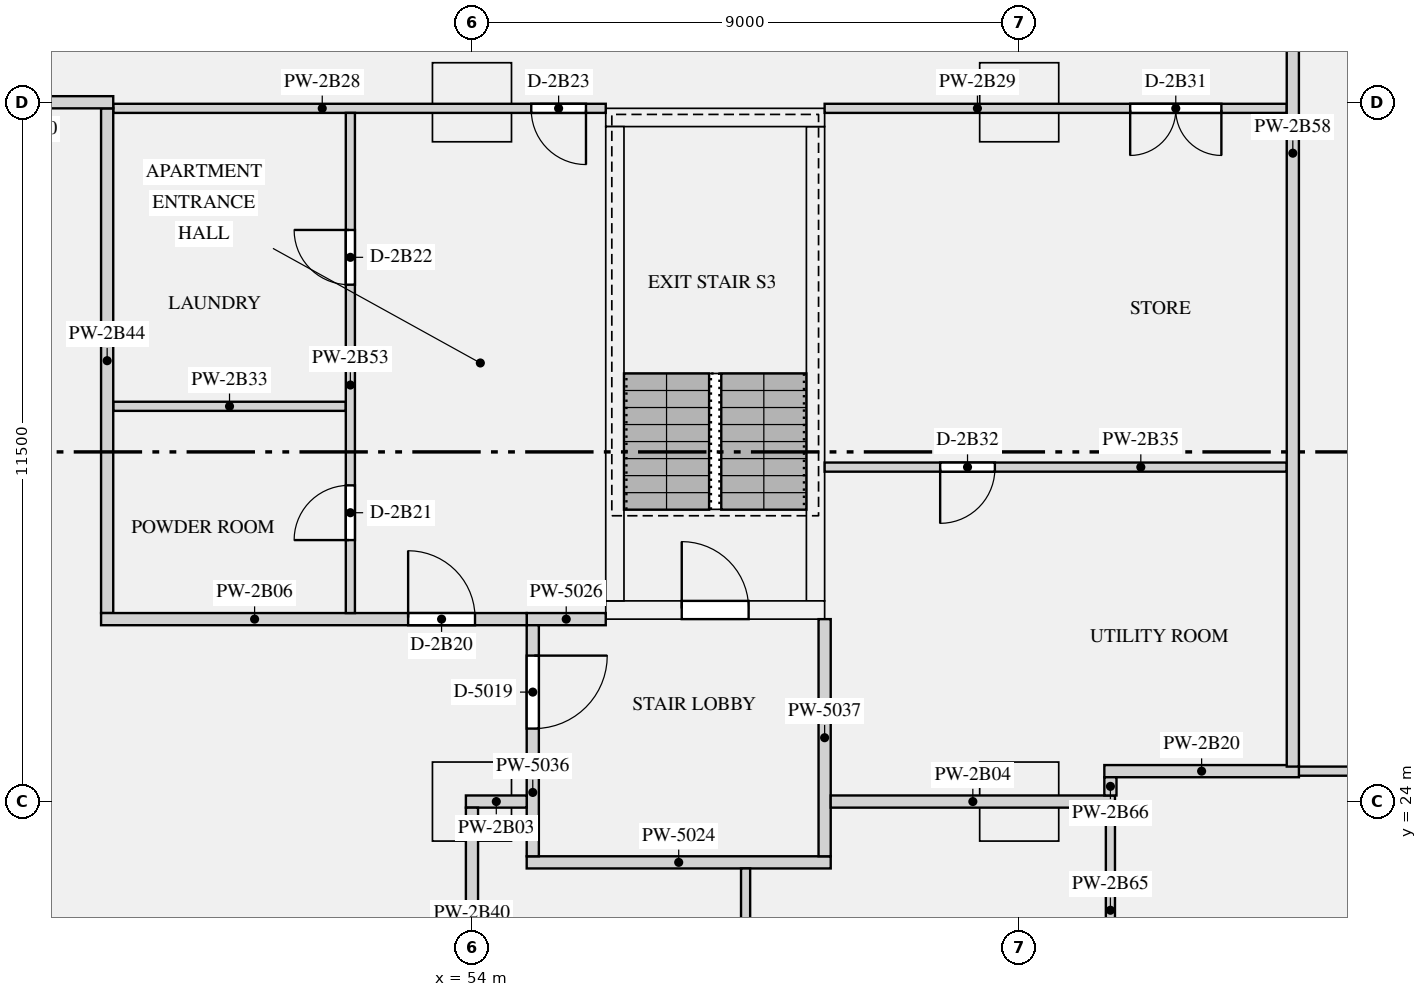
"""IFC4 building model, lengths in metres.
Left out: names, types, materials, properties, quantities, classifications, styles, units other than length and angle.
Written with IfcOpenShell. Run it as: python <this file> out.ifc"""

import sys

from ifc_helpers import new_model, si_unit, direction, frame, frame_2d, origin, origin_2d, place, context, subcontext, project, spatial, rectangle, extrude, element, fill, save


model = new_model("IFC4")
c1 = context("Model", 3, precision=1e-05, world=origin(), true_north=direction((0.0, 1.0)))
c2 = subcontext(c1, "Body", "Model", "MODEL_VIEW")
j1 = project(units=[si_unit("LENGTHUNIT", "METRE"), si_unit("PLANEANGLEUNIT", "RADIAN")], contexts=[c1])
p1 = place(None, origin())
s1 = spatial("IfcSite", under=j1, at=p1, CompositionType="ELEMENT")
p2 = place(p1, origin())
s2 = spatial("IfcBuilding", under=s1, at=p2, CompositionType="ELEMENT")
p3 = place(p2, frame((0.0, 0.0, 93.0)))
s3 = spatial("IfcBuildingStorey", under=s2, at=p3, CompositionType="ELEMENT", Elevation=93.0)
for number, where, z_axis, x_axis in (
    (1, (54.0, 24.0, 0.0), (0.0, 0.0, 1.0), (1.0, 0.0, 0.0)),
    (2, (63.0, 24.0, 0.0), (0.0, 0.0, 1.0), (1.0, 0.0, 0.0)),
    (3, (54.0, 35.5, 0.0), (0.0, 0.0, 1.0), (1.0, 0.0, 0.0)),
    (4, (63.0, 35.5, 0.0), (0.0, 0.0, 1.0), (1.0, 0.0, 0.0)),
):
    element("IfcColumn", number, at=place(p3, frame(where, z_axis=z_axis, x_axis=x_axis)), inside=s3, PredefinedType="COLUMN", context=c2, shape_type="SweptSolid", body=[
        extrude(rectangle(XDim=1.3, YDim=1.3, at=origin_2d()), origin(), (0.0, 0.0, 1.0), 3.15),
    ])
p4 = place(p3, frame((56.2, 27.15, 0.0), z_axis=(0.0, 0.0, 1.0), x_axis=(1.0, 0.0, 0.0)))
e5 = element("IfcWall", 5, at=p4, inside=s3, PredefinedType="SHEAR", context=c2, shape_type="SweptSolid", body=[
    extrude(rectangle(XDim=3.6, YDim=0.3, at=frame_2d((1.8, 0.0))), origin(), (0.0, 0.0, 1.0), 3.15),
])
p5 = place(p4, frame((1.25, 0.0, 0.0)))
e6 = element("IfcOpeningElement", 6, at=p5, cuts=e5, PredefinedType="OPENING", context=c2, shape_type="SweptSolid", body=[
    extrude(rectangle(XDim=1.1, YDim=2.1, at=frame_2d((0.55, 1.05))), frame((0.0, 0.16, 0.0), z_axis=(0.0, -1.0, 0.0), x_axis=(1.0, 0.0, 0.0)), (0.0, 0.0, 1.0), 0.32),
])
p6 = place(p3, frame((56.2, 35.25, 0.0), z_axis=(0.0, 0.0, 1.0), x_axis=(1.0, 0.0, 0.0)))
e7 = element("IfcWall", 7, at=p6, inside=s3, PredefinedType="SHEAR", context=c2, shape_type="SweptSolid", body=[
    extrude(rectangle(XDim=3.6, YDim=0.3, at=frame_2d((1.8, 0.0))), origin(), (0.0, 0.0, 1.0), 3.15),
])
for number, where, z_axis, x_axis in (
    (8, (56.35, 27.3, 0.0), (0.0, 0.0, 1.0), (0.0, 1.0, 0.0)),
    (9, (59.65, 27.3, 0.0), (0.0, 0.0, 1.0), (0.0, 1.0, 0.0)),
):
    element("IfcWall", number, at=place(p3, frame(where, z_axis=z_axis, x_axis=x_axis)), inside=s3, PredefinedType="SHEAR", context=c2, shape_type="SweptSolid", body=[
        extrude(rectangle(XDim=7.8, YDim=0.3, at=frame_2d((3.9, 0.0))), origin(), (0.0, 0.0, 1.0), 3.15),
    ])
p7 = place(p3, frame((54.9, 23.0, 0.0), z_axis=(0.0, 0.0, 1.0), x_axis=(1.0, 0.0, 0.0)))
e10 = element("IfcWall", 10, at=p7, inside=s3, PredefinedType="PARTITIONING", context=c2, shape_type="SweptSolid", body=[
    extrude(rectangle(XDim=5.0, YDim=0.2, at=frame_2d((2.5, 0.0))), origin(), (0.0, 0.0, 1.0), 2.83),
])
p8 = place(p3, frame((54.9, 27.0, 0.0), z_axis=(0.0, 0.0, 1.0), x_axis=(1.0, 0.0, 0.0)))
e11 = element("IfcWall", 11, at=p8, inside=s3, PredefinedType="PARTITIONING", context=c2, shape_type="SweptSolid", body=[
    extrude(rectangle(XDim=1.3, YDim=0.2, at=frame_2d((0.65, 0.0))), origin(), (0.0, 0.0, 1.0), 2.83),
])
p9 = place(p3, frame((55.0, 23.1, 0.0), z_axis=(0.0, 0.0, 1.0), x_axis=(0.0, 1.0, 0.0)))
e12 = element("IfcWall", 12, at=p9, inside=s3, PredefinedType="PARTITIONING", context=c2, shape_type="SweptSolid", body=[
    extrude(rectangle(XDim=3.8, YDim=0.2, at=frame_2d((1.9, 0.0))), origin(), (0.0, 0.0, 1.0), 2.83),
])
p10 = place(p9, frame((2.1, 0.0, 0.0)))
e13 = element("IfcOpeningElement", 13, at=p10, cuts=e12, PredefinedType="OPENING", context=c2, shape_type="SweptSolid", body=[
    extrude(rectangle(XDim=1.2, YDim=2.1, at=frame_2d((0.6, 1.05))), frame((0.0, 0.11, 0.0), z_axis=(0.0, -1.0, 0.0), x_axis=(1.0, 0.0, 0.0)), (0.0, 0.0, 1.0), 0.22),
])
p11 = place(p3, frame((59.8, 23.1, 0.0), z_axis=(0.0, 0.0, 1.0), x_axis=(0.0, 1.0, 0.0)))
e14 = element("IfcWall", 14, at=p11, inside=s3, PredefinedType="PARTITIONING", context=c2, shape_type="SweptSolid", body=[
    extrude(rectangle(XDim=3.9, YDim=0.2, at=frame_2d((1.95, 0.0))), origin(), (0.0, 0.0, 1.0), 2.83),
])
p12 = place(p3, frame((53.9, 24.0, 0.0), z_axis=(0.0, 0.0, 1.0), x_axis=(1.0, 0.0, 0.0)))
e15 = element("IfcWall", 15, at=p12, inside=s3, PredefinedType="PARTITIONING", context=c2, shape_type="SweptSolid", body=[
    extrude(rectangle(XDim=1.0, YDim=0.2, at=frame_2d((0.5, 0.0))), origin(), (0.0, 0.0, 1.0), 2.83),
])
p13 = place(p3, frame((59.9, 24.0, 0.0), z_axis=(0.0, 0.0, 1.0), x_axis=(1.0, 0.0, 0.0)))
e16 = element("IfcWall", 16, at=p13, inside=s3, PredefinedType="PARTITIONING", context=c2, shape_type="SweptSolid", body=[
    extrude(rectangle(XDim=4.675, YDim=0.2, at=frame_2d((2.337, 0.0))), origin(), (0.0, 0.0, 1.0), 2.83),
])
p14 = place(p3, frame((47.9, 27.0, 0.0), z_axis=(0.0, 0.0, 1.0), x_axis=(1.0, 0.0, 0.0)))
e17 = element("IfcWall", 17, at=p14, inside=s3, PredefinedType="PARTITIONING", context=c2, shape_type="SweptSolid", body=[
    extrude(rectangle(XDim=7.0, YDim=0.2, at=frame_2d((3.5, 0.0))), origin(), (0.0, 0.0, 1.0), 2.83),
])
p15 = place(p14, frame((5.05, 0.0, 0.0)))
e18 = element("IfcOpeningElement", 18, at=p15, cuts=e17, PredefinedType="OPENING", context=c2, shape_type="SweptSolid", body=[
    extrude(rectangle(XDim=1.1, YDim=2.1, at=frame_2d((0.55, 1.05))), frame((0.0, 0.11, 0.0), z_axis=(0.0, -1.0, 0.0), x_axis=(1.0, 0.0, 0.0)), (0.0, 0.0, 1.0), 0.22),
])
p16 = place(p3, frame((45.0, 35.5, 0.0), z_axis=(0.0, 0.0, 1.0), x_axis=(1.0, 0.0, 0.0)))
e19 = element("IfcWall", 19, at=p16, inside=s3, PredefinedType="PARTITIONING", context=c2, shape_type="SweptSolid", body=[
    extrude(rectangle(XDim=3.1, YDim=0.2, at=frame_2d((1.55, 0.0))), origin(), (0.0, 0.0, 1.0), 2.83),
])
p17 = place(p3, frame((67.4, 24.5, 0.0), z_axis=(0.0, 0.0, 1.0), x_axis=(1.0, 0.0, 0.0)))
e20 = element("IfcWall", 20, at=p17, inside=s3, PredefinedType="PARTITIONING", context=c2, shape_type="SweptSolid", body=[
    extrude(rectangle(XDim=4.675, YDim=0.15, at=frame_2d((2.337, 0.0))), origin(), (0.0, 0.0, 1.0), 2.83),
])
p18 = place(p17, frame((1.275, 0.0, 0.0)))
e21 = element("IfcOpeningElement", 21, at=p18, cuts=e20, PredefinedType="OPENING", context=c2, shape_type="SweptSolid", body=[
    extrude(rectangle(XDim=1.5, YDim=2.1, at=frame_2d((0.75, 1.05))), frame((0.0, 0.085, 0.0), z_axis=(0.0, -1.0, 0.0), x_axis=(1.0, 0.0, 0.0)), (0.0, 0.0, 1.0), 0.17),
])
p19 = place(p3, frame((64.4, 24.5, 0.0), z_axis=(0.0, 0.0, 1.0), x_axis=(1.0, 0.0, 0.0)))
e22 = element("IfcWall", 22, at=p19, inside=s3, PredefinedType="PARTITIONING", context=c2, shape_type="SweptSolid", body=[
    extrude(rectangle(XDim=3.2, YDim=0.2, at=frame_2d((1.6, 0.0))), origin(), (0.0, 0.0, 1.0), 2.83),
])
p20 = place(p3, frame((48.1, 35.4, 0.0), z_axis=(0.0, 0.0, 1.0), x_axis=(1.0, 0.0, 0.0)))
e23 = element("IfcWall", 23, at=p20, inside=s3, PredefinedType="PARTITIONING", context=c2, shape_type="SweptSolid", body=[
    extrude(rectangle(XDim=8.1, YDim=0.15, at=frame_2d((4.05, 0.0))), origin(), (0.0, 0.0, 1.0), 2.83),
])
p21 = place(p20, frame((6.875, 0.0, 0.0)))
e24 = element("IfcOpeningElement", 24, at=p21, cuts=e23, PredefinedType="OPENING", context=c2, shape_type="SweptSolid", body=[
    extrude(rectangle(XDim=0.9, YDim=2.1, at=frame_2d((0.45, 1.05))), frame((0.0, 0.085, 0.0), z_axis=(0.0, -1.0, 0.0), x_axis=(1.0, 0.0, 0.0)), (0.0, 0.0, 1.0), 0.17),
])
p22 = place(p3, frame((59.8, 35.4, 0.0), z_axis=(0.0, 0.0, 1.0), x_axis=(1.0, 0.0, 0.0)))
e25 = element("IfcWall", 25, at=p22, inside=s3, PredefinedType="PARTITIONING", context=c2, shape_type="SweptSolid", body=[
    extrude(rectangle(XDim=7.6, YDim=0.15, at=frame_2d((3.8, 0.0))), origin(), (0.0, 0.0, 1.0), 2.83),
])
p23 = place(p22, frame((5.025, 0.0, 0.0)))
e26 = element("IfcOpeningElement", 26, at=p23, cuts=e25, PredefinedType="OPENING", context=c2, shape_type="SweptSolid", body=[
    extrude(rectangle(XDim=1.5, YDim=2.1, at=frame_2d((0.75, 1.05))), frame((0.0, 0.085, 0.0), z_axis=(0.0, -1.0, 0.0), x_axis=(1.0, 0.0, 0.0)), (0.0, 0.0, 1.0), 0.17),
])
p24 = place(p3, frame((48.1, 30.5, 0.0), z_axis=(0.0, 0.0, 1.0), x_axis=(1.0, 0.0, 0.0)))
e27 = element("IfcWall", 27, at=p24, inside=s3, PredefinedType="PARTITIONING", context=c2, shape_type="SweptSolid", body=[
    extrude(rectangle(XDim=3.825, YDim=0.15, at=frame_2d((1.913, 0.0))), origin(), (0.0, 0.0, 1.0), 2.83),
])
p25 = place(p3, frame((59.8, 29.5, 0.0), z_axis=(0.0, 0.0, 1.0), x_axis=(1.0, 0.0, 0.0)))
e28 = element("IfcWall", 28, at=p25, inside=s3, PredefinedType="PARTITIONING", context=c2, shape_type="SweptSolid", body=[
    extrude(rectangle(XDim=7.6, YDim=0.15, at=frame_2d((3.8, 0.0))), origin(), (0.0, 0.0, 1.0), 2.83),
])
p26 = place(p25, frame((1.9, 0.0, 0.0)))
e29 = element("IfcOpeningElement", 29, at=p26, cuts=e28, PredefinedType="OPENING", context=c2, shape_type="SweptSolid", body=[
    extrude(rectangle(XDim=0.9, YDim=2.1, at=frame_2d((0.45, 1.05))), frame((0.0, 0.085, 0.0), z_axis=(0.0, -1.0, 0.0), x_axis=(1.0, 0.0, 0.0)), (0.0, 0.0, 1.0), 0.17),
])
p27 = place(p3, frame((54.0, 16.1, 0.0), z_axis=(0.0, 0.0, 1.0), x_axis=(0.0, 1.0, 0.0)))
e30 = element("IfcWall", 30, at=p27, inside=s3, PredefinedType="PARTITIONING", context=c2, shape_type="SweptSolid", body=[
    extrude(rectangle(XDim=7.8, YDim=0.2, at=frame_2d((3.9, 0.0))), origin(), (0.0, 0.0, 1.0), 2.83),
])
p28 = place(p27, frame((2.35, 0.0, 0.0)))
e31 = element("IfcOpeningElement", 31, at=p28, cuts=e30, PredefinedType="OPENING", context=c2, shape_type="SweptSolid", body=[
    extrude(rectangle(XDim=1.1, YDim=2.1, at=frame_2d((0.55, 1.05))), frame((0.0, 0.11, 0.0), z_axis=(0.0, -1.0, 0.0), x_axis=(1.0, 0.0, 0.0)), (0.0, 0.0, 1.0), 0.22),
])
p29 = place(p3, frame((48.0, 27.1, 0.0), z_axis=(0.0, 0.0, 1.0), x_axis=(0.0, 1.0, 0.0)))
e32 = element("IfcWall", 32, at=p29, inside=s3, PredefinedType="PARTITIONING", context=c2, shape_type="SweptSolid", body=[
    extrude(rectangle(XDim=8.3, YDim=0.2, at=frame_2d((4.15, 0.0))), origin(), (0.0, 0.0, 1.0), 2.83),
])
p30 = place(p3, frame((52.0, 27.1, 0.0), z_axis=(0.0, 0.0, 1.0), x_axis=(0.0, 1.0, 0.0)))
e33 = element("IfcWall", 33, at=p30, inside=s3, PredefinedType="PARTITIONING", context=c2, shape_type="SweptSolid", body=[
    extrude(rectangle(XDim=8.225, YDim=0.15, at=frame_2d((4.112, 0.0))), origin(), (0.0, 0.0, 1.0), 2.83),
])
p31 = place(p30, frame((1.2, 0.0, 0.0)))
e34 = element("IfcOpeningElement", 34, at=p31, cuts=e33, PredefinedType="OPENING", context=c2, shape_type="SweptSolid", body=[
    extrude(rectangle(XDim=0.9, YDim=2.1, at=frame_2d((0.45, 1.05))), frame((0.0, 0.085, 0.0), z_axis=(0.0, -1.0, 0.0), x_axis=(1.0, 0.0, 0.0)), (0.0, 0.0, 1.0), 0.17),
])
p32 = place(p30, frame((5.4, 0.0, 0.0)))
e35 = element("IfcOpeningElement", 35, at=p32, cuts=e33, PredefinedType="OPENING", context=c2, shape_type="SweptSolid", body=[
    extrude(rectangle(XDim=0.9, YDim=2.1, at=frame_2d((0.45, 1.05))), frame((0.0, 0.085, 0.0), z_axis=(0.0, -1.0, 0.0), x_axis=(1.0, 0.0, 0.0)), (0.0, 0.0, 1.0), 0.17),
])
p33 = place(p3, frame((67.5, 24.575, 0.0), z_axis=(0.0, 0.0, 1.0), x_axis=(0.0, 1.0, 0.0)))
e36 = element("IfcWall", 36, at=p33, inside=s3, PredefinedType="PARTITIONING", context=c2, shape_type="SweptSolid", body=[
    extrude(rectangle(XDim=20.175, YDim=0.2, at=frame_2d((10.087, 0.0))), origin(), (0.0, 0.0, 1.0), 2.83),
])
p34 = place(p3, frame((58.5, 16.575, 0.0), z_axis=(0.0, 0.0, 1.0), x_axis=(0.0, 1.0, 0.0)))
e37 = element("IfcWall", 37, at=p34, inside=s3, PredefinedType="PARTITIONING", context=c2, shape_type="SweptSolid", body=[
    extrude(rectangle(XDim=6.325, YDim=0.15, at=frame_2d((3.163, 0.0))), origin(), (0.0, 0.0, 1.0), 2.83),
])
p35 = place(p34, frame((2.75, 0.0, 0.0)))
e38 = element("IfcOpeningElement", 38, at=p35, cuts=e37, PredefinedType="OPENING", context=c2, shape_type="SweptSolid", body=[
    extrude(rectangle(XDim=0.9, YDim=2.1, at=frame_2d((0.45, 1.05))), frame((0.0, 0.085, 0.0), z_axis=(0.0, -1.0, 0.0), x_axis=(1.0, 0.0, 0.0)), (0.0, 0.0, 1.0), 0.17),
])
p36 = place(p3, frame((64.5, 16.575, 0.0), z_axis=(0.0, 0.0, 1.0), x_axis=(0.0, 1.0, 0.0)))
e39 = element("IfcWall", 39, at=p36, inside=s3, PredefinedType="PARTITIONING", context=c2, shape_type="SweptSolid", body=[
    extrude(rectangle(XDim=7.325, YDim=0.15, at=frame_2d((3.663, 0.0))), origin(), (0.0, 0.0, 1.0), 2.83),
])
p37 = place(p36, frame((3.05, 0.0, 0.0)))
e40 = element("IfcOpeningElement", 40, at=p37, cuts=e39, PredefinedType="OPENING", context=c2, shape_type="SweptSolid", body=[
    extrude(rectangle(XDim=0.9, YDim=2.1, at=frame_2d((0.45, 1.05))), frame((0.0, 0.085, 0.0), z_axis=(0.0, -1.0, 0.0), x_axis=(1.0, 0.0, 0.0)), (0.0, 0.0, 1.0), 0.17),
])
p38 = place(p3, frame((64.5, 24.1, 0.0), z_axis=(0.0, 0.0, 1.0), x_axis=(0.0, 1.0, 0.0)))
e41 = element("IfcWall", 41, at=p38, inside=s3, PredefinedType="PARTITIONING", context=c2, shape_type="SweptSolid", body=[
    extrude(rectangle(XDim=0.3, YDim=0.2, at=frame_2d((0.15, 0.0))), origin(), (0.0, 0.0, 1.0), 2.83),
])
p39 = place(p5, origin())
e42 = element("IfcDoor", 42, at=p39, inside=s3, OperationType="SINGLE_SWING_LEFT", PredefinedType="DOOR", context=c2, shape_type="SweptSolid", body=[
    extrude(rectangle(XDim=1.1, YDim=2.1, at=frame_2d((0.55, 1.05))), frame((0.0, 0.025, 0.0), z_axis=(0.0, -1.0, 0.0), x_axis=(1.0, 0.0, 0.0)), (0.0, 0.0, 1.0), 0.05),
])
fill(e6, e42)
p40 = place(p10, frame((1.2, 0.0, 0.0), z_axis=(0.0, 0.0, 1.0), x_axis=(-1.0, 0.0, 0.0)))
e43 = element("IfcDoor", 43, at=p40, inside=s3, OperationType="SINGLE_SWING_LEFT", PredefinedType="DOOR", context=c2, shape_type="SweptSolid", body=[
    extrude(rectangle(XDim=1.2, YDim=2.1, at=frame_2d((0.6, 1.05))), frame((0.0, 0.025, 0.0), z_axis=(0.0, -1.0, 0.0), x_axis=(1.0, 0.0, 0.0)), (0.0, 0.0, 1.0), 0.05),
])
fill(e13, e43)
p41 = place(p15, origin())
e44 = element("IfcDoor", 44, at=p41, inside=s3, OperationType="SINGLE_SWING_LEFT", PredefinedType="DOOR", context=c2, shape_type="SweptSolid", body=[
    extrude(rectangle(XDim=1.1, YDim=2.1, at=frame_2d((0.55, 1.05))), frame((0.0, 0.025, 0.0), z_axis=(0.0, -1.0, 0.0), x_axis=(1.0, 0.0, 0.0)), (0.0, 0.0, 1.0), 0.05),
])
fill(e18, e44)
p42 = place(p31, origin())
e45 = element("IfcDoor", 45, at=p42, inside=s3, OperationType="SINGLE_SWING_LEFT", PredefinedType="DOOR", context=c2, shape_type="SweptSolid", body=[
    extrude(rectangle(XDim=0.9, YDim=2.1, at=frame_2d((0.45, 1.05))), frame((0.0, 0.025, 0.0), z_axis=(0.0, -1.0, 0.0), x_axis=(1.0, 0.0, 0.0)), (0.0, 0.0, 1.0), 0.05),
])
fill(e34, e45)
p43 = place(p32, origin())
e46 = element("IfcDoor", 46, at=p43, inside=s3, OperationType="SINGLE_SWING_RIGHT", PredefinedType="DOOR", context=c2, shape_type="SweptSolid", body=[
    extrude(rectangle(XDim=0.9, YDim=2.1, at=frame_2d((0.45, 1.05))), frame((0.0, 0.025, 0.0), z_axis=(0.0, -1.0, 0.0), x_axis=(1.0, 0.0, 0.0)), (0.0, 0.0, 1.0), 0.05),
])
fill(e35, e46)
p44 = place(p21, frame((0.9, 0.0, 0.0), z_axis=(0.0, 0.0, 1.0), x_axis=(-1.0, 0.0, 0.0)))
e47 = element("IfcDoor", 47, at=p44, inside=s3, OperationType="SINGLE_SWING_LEFT", PredefinedType="DOOR", context=c2, shape_type="SweptSolid", body=[
    extrude(rectangle(XDim=0.9, YDim=2.1, at=frame_2d((0.45, 1.05))), frame((0.0, 0.025, 0.0), z_axis=(0.0, -1.0, 0.0), x_axis=(1.0, 0.0, 0.0)), (0.0, 0.0, 1.0), 0.05),
])
fill(e24, e47)
p45 = place(p23, frame((1.5, 0.0, 0.0), z_axis=(0.0, 0.0, 1.0), x_axis=(-1.0, 0.0, 0.0)))
e48 = element("IfcDoor", 48, at=p45, inside=s3, OperationType="DOUBLE_DOOR_SINGLE_SWING", PredefinedType="DOOR", context=c2, shape_type="SweptSolid", body=[
    extrude(rectangle(XDim=1.5, YDim=2.1, at=frame_2d((0.75, 1.05))), frame((0.0, 0.025, 0.0), z_axis=(0.0, -1.0, 0.0), x_axis=(1.0, 0.0, 0.0)), (0.0, 0.0, 1.0), 0.05),
])
fill(e26, e48)
p46 = place(p26, frame((0.9, 0.0, 0.0), z_axis=(0.0, 0.0, 1.0), x_axis=(-1.0, 0.0, 0.0)))
e49 = element("IfcDoor", 49, at=p46, inside=s3, OperationType="SINGLE_SWING_RIGHT", PredefinedType="DOOR", context=c2, shape_type="SweptSolid", body=[
    extrude(rectangle(XDim=0.9, YDim=2.1, at=frame_2d((0.45, 1.05))), frame((0.0, 0.025, 0.0), z_axis=(0.0, -1.0, 0.0), x_axis=(1.0, 0.0, 0.0)), (0.0, 0.0, 1.0), 0.05),
])
fill(e29, e49)
save(model, sys.argv[1])
